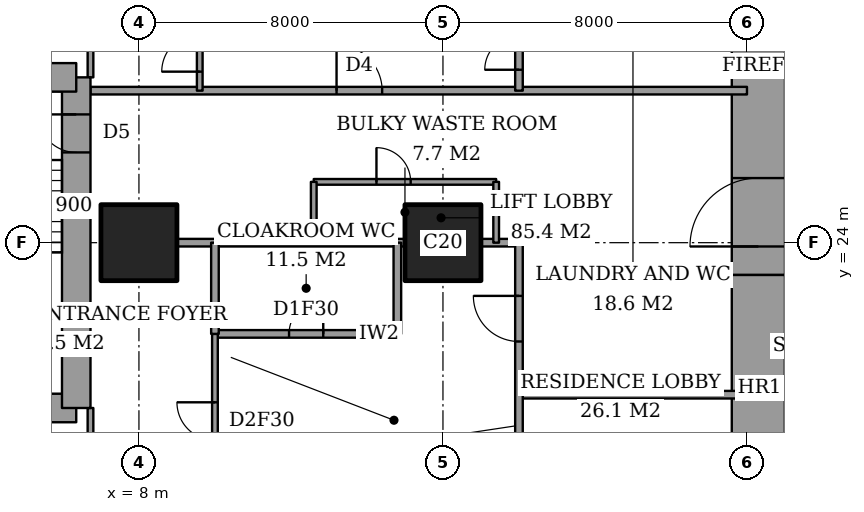
"""IFC4 building model, lengths in metres.
Left out: names, types, materials, properties, quantities, classifications, styles, units other than length and angle.
Written with IfcOpenShell. Run it as: python <this file> out.ifc"""

import sys

from ifc_helpers import new_model, si_unit, direction, frame, frame_2d, origin, origin_2d, place, context, subcontext, project, spatial, rectangle, extrude, element, fill, save


model = new_model("IFC4")
c1 = context("Model", 3, precision=1e-05, world=origin(), true_north=direction((0.0, 1.0)))
c2 = subcontext(c1, "Body", "Model", "MODEL_VIEW")
j1 = project(units=[si_unit("LENGTHUNIT", "METRE"), si_unit("PLANEANGLEUNIT", "RADIAN")], contexts=[c1])
p1 = place(None, origin())
s1 = spatial("IfcSite", under=j1, at=p1, CompositionType="ELEMENT")
p2 = place(p1, origin())
s2 = spatial("IfcBuilding", under=s1, at=p2, CompositionType="ELEMENT")
p3 = place(p2, frame((0.0, 0.0, 40.4)))
s3 = spatial("IfcBuildingStorey", under=s2, at=p3, CompositionType="ELEMENT", Elevation=40.4)
for number, where, z_axis, x_axis in (
    (1, (8.0, 24.0, 0.0), (0.0, 0.0, 1.0), (1.0, 0.0, 0.0)),
    (2, (16.0, 24.0, 0.0), (0.0, 0.0, 1.0), (1.0, 0.0, 0.0)),
):
    element("IfcColumn", number, at=place(p3, frame(where, z_axis=z_axis, x_axis=x_axis)), inside=s3, PredefinedType="COLUMN", context=c2, shape_type="SweptSolid", body=[
        extrude(rectangle(XDim=2.0, YDim=2.0, at=origin_2d()), origin(), (0.0, 0.0, 1.0), 3.6),
    ])
p4 = place(p3, frame((24.3, 13.0, 0.0), z_axis=(0.0, 0.0, 1.0), x_axis=(0.0, 1.0, 0.0)))
e3 = element("IfcWall", 3, at=p4, inside=s3, PredefinedType="SHEAR", context=c2, shape_type="SweptSolid", body=[
    extrude(rectangle(XDim=10.15, YDim=1.4, at=frame_2d((5.075, 0.0))), origin(), (0.0, 0.0, 1.0), 3.6),
])
p5 = place(p3, frame((24.3, 23.15, 0.0), z_axis=(0.0, 0.0, 1.0), x_axis=(0.0, 1.0, 0.0)))
e4 = element("IfcWall", 4, at=p5, inside=s3, PredefinedType="SHEAR", context=c2, shape_type="SweptSolid", body=[
    extrude(rectangle(XDim=11.85, YDim=1.4, at=frame_2d((5.925, 0.0))), origin(), (0.0, 0.0, 1.0), 3.6),
])
p6 = place(p5, frame((0.75, 0.0, 0.0)))
e5 = element("IfcOpeningElement", 5, at=p6, cuts=e4, PredefinedType="OPENING", context=c2, shape_type="SweptSolid", body=[
    extrude(rectangle(XDim=1.8, YDim=2.4, at=frame_2d((0.9, 1.2))), frame((0.0, 0.71, 0.0), z_axis=(0.0, -1.0, 0.0), x_axis=(1.0, 0.0, 0.0)), (0.0, 0.0, 1.0), 1.42),
])
p7 = place(p3, frame((1.9, 19.65, 0.0), z_axis=(0.0, 0.0, 1.0), x_axis=(1.0, 0.0, 0.0)))
e6 = element("IfcWall", 6, at=p7, inside=s3, PredefinedType="SHEAR", context=c2, shape_type="SweptSolid", body=[
    extrude(rectangle(XDim=4.45, YDim=0.75, at=frame_2d((2.225, 0.0))), origin(), (0.0, 0.0, 1.0), 3.6),
])
p8 = place(p3, frame((6.35, 19.65, 0.0), z_axis=(0.0, 0.0, 1.0), x_axis=(0.0, 1.0, 0.0)))
e7 = element("IfcWall", 7, at=p8, inside=s3, PredefinedType="SHEAR", context=c2, shape_type="SweptSolid", body=[
    extrude(rectangle(XDim=8.7, YDim=0.75, at=frame_2d((4.35, 0.0))), origin(), (0.0, 0.0, 1.0), 3.6),
])
p9 = place(p8, frame((6.725, 0.0, 0.0)))
e8 = element("IfcOpeningElement", 8, at=p9, cuts=e7, PredefinedType="OPENING", context=c2, shape_type="SweptSolid", body=[
    extrude(rectangle(XDim=1.0, YDim=2.1, at=frame_2d((0.5, 1.05))), frame((0.0, 0.385, 0.0), z_axis=(0.0, -1.0, 0.0), x_axis=(1.0, 0.0, 0.0)), (0.0, 0.0, 1.0), 0.77),
])
p10 = place(p3, frame((6.35, 28.35, 0.0), z_axis=(0.0, 0.0, 1.0), x_axis=(-1.0, 0.0, 0.0)))
e9 = element("IfcWall", 9, at=p10, inside=s3, PredefinedType="SHEAR", context=c2, shape_type="SweptSolid", body=[
    extrude(rectangle(XDim=4.45, YDim=0.75, at=frame_2d((2.225, 0.0))), origin(), (0.0, 0.0, 1.0), 3.6),
])
p11 = place(p3, frame((18.0, 20.0, 0.0), z_axis=(0.0, 0.0, 1.0), x_axis=(1.0, 0.0, 0.0)))
e10 = element("IfcWall", 10, at=p11, inside=s3, PredefinedType="PARTITIONING", context=c2, shape_type="SweptSolid", body=[
    extrude(rectangle(XDim=6.0, YDim=0.2, at=frame_2d((3.0, 0.0))), origin(), (0.0, 0.0, 1.0), 3.35),
])
p12 = place(p3, frame((10.0, 21.6, 0.0), z_axis=(0.0, 0.0, 1.0), x_axis=(1.0, 0.0, 0.0)))
e11 = element("IfcWall", 11, at=p12, inside=s3, PredefinedType="PARTITIONING", context=c2, shape_type="SweptSolid", body=[
    extrude(rectangle(XDim=4.8, YDim=0.2, at=frame_2d((2.4, 0.0))), origin(), (0.0, 0.0, 1.0), 3.35),
])
p13 = place(p12, frame((1.95, 0.0, 0.0)))
e12 = element("IfcOpeningElement", 12, at=p13, cuts=e11, PredefinedType="OPENING", context=c2, shape_type="SweptSolid", body=[
    extrude(rectangle(XDim=0.9, YDim=2.1, at=frame_2d((0.45, 1.05))), frame((0.0, 0.11, 0.0), z_axis=(0.0, -1.0, 0.0), x_axis=(1.0, 0.0, 0.0)), (0.0, 0.0, 1.0), 0.22),
])
p14 = place(p3, frame((9.0, 24.0, 0.0), z_axis=(0.0, 0.0, 1.0), x_axis=(1.0, 0.0, 0.0)))
e13 = element("IfcWall", 13, at=p14, inside=s3, PredefinedType="PARTITIONING", context=c2, shape_type="SweptSolid", body=[
    extrude(rectangle(XDim=6.0, YDim=0.2, at=frame_2d((3.0, 0.0))), origin(), (0.0, 0.0, 1.0), 3.35),
])
p15 = place(p3, frame((17.0, 24.0, 0.0), z_axis=(0.0, 0.0, 1.0), x_axis=(1.0, 0.0, 0.0)))
e14 = element("IfcWall", 14, at=p15, inside=s3, PredefinedType="PARTITIONING", context=c2, shape_type="SweptSolid", body=[
    extrude(rectangle(XDim=1.0, YDim=0.2, at=frame_2d((0.5, 0.0))), origin(), (0.0, 0.0, 1.0), 3.35),
])
p16 = place(p3, frame((12.6, 25.6, 0.0), z_axis=(0.0, 0.0, 1.0), x_axis=(1.0, 0.0, 0.0)))
e15 = element("IfcWall", 15, at=p16, inside=s3, PredefinedType="PARTITIONING", context=c2, shape_type="SweptSolid", body=[
    extrude(rectangle(XDim=4.8, YDim=0.15, at=frame_2d((2.4, 0.0))), origin(), (0.0, 0.0, 1.0), 3.35),
])
p17 = place(p16, frame((1.65, 0.0, 0.0)))
e16 = element("IfcOpeningElement", 16, at=p17, cuts=e15, PredefinedType="OPENING", context=c2, shape_type="SweptSolid", body=[
    extrude(rectangle(XDim=0.9, YDim=2.1, at=frame_2d((0.45, 1.05))), frame((0.0, 0.085, 0.0), z_axis=(0.0, -1.0, 0.0), x_axis=(1.0, 0.0, 0.0)), (0.0, 0.0, 1.0), 0.17),
])
p18 = place(p3, frame((6.725, 28.0, 0.0), z_axis=(0.0, 0.0, 1.0), x_axis=(1.0, 0.0, 0.0)))
e17 = element("IfcWall", 17, at=p18, inside=s3, PredefinedType="PARTITIONING", context=c2, shape_type="SweptSolid", body=[
    extrude(rectangle(XDim=17.275, YDim=0.2, at=frame_2d((8.637, 0.0))), origin(), (0.0, 0.0, 1.0), 3.35),
])
p19 = place(p18, frame((6.475, 0.0, 0.0)))
e18 = element("IfcOpeningElement", 18, at=p19, cuts=e17, PredefinedType="OPENING", context=c2, shape_type="SweptSolid", body=[
    extrude(rectangle(XDim=1.2, YDim=2.4, at=frame_2d((0.6, 1.2))), frame((0.0, 0.11, 0.0), z_axis=(0.0, -1.0, 0.0), x_axis=(1.0, 0.0, 0.0)), (0.0, 0.0, 1.0), 0.22),
])
p20 = place(p3, frame((6.725, 17.2, 0.0), z_axis=(0.0, 0.0, 1.0), x_axis=(0.0, 1.0, 0.0)))
e19 = element("IfcWall", 19, at=p20, inside=s3, PredefinedType="PARTITIONING", context=c2, shape_type="SweptSolid", body=[
    extrude(rectangle(XDim=2.45, YDim=0.15, at=frame_2d((1.225, 0.0))), origin(), (0.0, 0.0, 1.0), 3.35),
])
p21 = place(p20, frame((0.538, 0.0, 0.0)))
e20 = element("IfcOpeningElement", 20, at=p21, cuts=e19, PredefinedType="OPENING", context=c2, shape_type="SweptSolid", body=[
    extrude(rectangle(XDim=1.0, YDim=2.1, at=frame_2d((0.5, 1.05))), frame((0.0, 0.085, 0.0), z_axis=(0.0, -1.0, 0.0), x_axis=(1.0, 0.0, 0.0)), (0.0, 0.0, 1.0), 0.17),
])
p22 = place(p3, frame((6.725, 28.35, 0.0), z_axis=(0.0, 0.0, 1.0), x_axis=(0.0, 1.0, 0.0)))
e21 = element("IfcWall", 21, at=p22, inside=s3, PredefinedType="PARTITIONING", context=c2, shape_type="SweptSolid", body=[
    extrude(rectangle(XDim=2.45, YDim=0.15, at=frame_2d((1.225, 0.0))), origin(), (0.0, 0.0, 1.0), 3.35),
])
p23 = place(p22, frame((0.913, 0.0, 0.0)))
e22 = element("IfcOpeningElement", 22, at=p23, cuts=e21, PredefinedType="OPENING", context=c2, shape_type="SweptSolid", body=[
    extrude(rectangle(XDim=1.0, YDim=2.1, at=frame_2d((0.5, 1.05))), frame((0.0, 0.085, 0.0), z_axis=(0.0, -1.0, 0.0), x_axis=(1.0, 0.0, 0.0)), (0.0, 0.0, 1.0), 0.17),
])
p24 = place(p3, frame((9.6, 28.0, 0.0), z_axis=(0.0, 0.0, 1.0), x_axis=(0.0, 1.0, 0.0)))
e23 = element("IfcWall", 23, at=p24, inside=s3, PredefinedType="PARTITIONING", context=c2, shape_type="SweptSolid", body=[
    extrude(rectangle(XDim=9.4, YDim=0.15, at=frame_2d((4.7, 0.0))), origin(), (0.0, 0.0, 1.0), 3.35),
])
p25 = place(p24, frame((0.5, 0.0, 0.0)))
e24 = element("IfcOpeningElement", 24, at=p25, cuts=e23, PredefinedType="OPENING", context=c2, shape_type="SweptSolid", body=[
    extrude(rectangle(XDim=1.0, YDim=2.1, at=frame_2d((0.5, 1.05))), frame((0.0, 0.085, 0.0), z_axis=(0.0, -1.0, 0.0), x_axis=(1.0, 0.0, 0.0)), (0.0, 0.0, 1.0), 0.17),
])
p26 = place(p3, frame((10.0, 21.6, 0.0), z_axis=(0.0, 0.0, 1.0), x_axis=(0.0, 1.0, 0.0)))
e25 = element("IfcWall", 25, at=p26, inside=s3, PredefinedType="PARTITIONING", context=c2, shape_type="SweptSolid", body=[
    extrude(rectangle(XDim=2.4, YDim=0.2, at=frame_2d((1.2, 0.0))), origin(), (0.0, 0.0, 1.0), 3.35),
])
p27 = place(p3, frame((10.0, 10.6, 0.0), z_axis=(0.0, 0.0, 1.0), x_axis=(0.0, 1.0, 0.0)))
e26 = element("IfcWall", 26, at=p27, inside=s3, PredefinedType="PARTITIONING", context=c2, shape_type="SweptSolid", body=[
    extrude(rectangle(XDim=11.0, YDim=0.15, at=frame_2d((5.5, 0.0))), origin(), (0.0, 0.0, 1.0), 3.35),
])
p28 = place(p27, frame((8.2, 0.0, 0.0)))
e27 = element("IfcOpeningElement", 27, at=p28, cuts=e26, PredefinedType="OPENING", context=c2, shape_type="SweptSolid", body=[
    extrude(rectangle(XDim=1.0, YDim=2.1, at=frame_2d((0.5, 1.05))), frame((0.0, 0.085, 0.0), z_axis=(0.0, -1.0, 0.0), x_axis=(1.0, 0.0, 0.0)), (0.0, 0.0, 1.0), 0.17),
])
p29 = place(p3, frame((12.6, 24.0, 0.0), z_axis=(0.0, 0.0, 1.0), x_axis=(0.0, 1.0, 0.0)))
e28 = element("IfcWall", 28, at=p29, inside=s3, PredefinedType="PARTITIONING", context=c2, shape_type="SweptSolid", body=[
    extrude(rectangle(XDim=1.6, YDim=0.15, at=frame_2d((0.8, 0.0))), origin(), (0.0, 0.0, 1.0), 3.35),
])
p30 = place(p3, frame((14.8, 21.6, 0.0), z_axis=(0.0, 0.0, 1.0), x_axis=(0.0, 1.0, 0.0)))
e29 = element("IfcWall", 29, at=p30, inside=s3, PredefinedType="PARTITIONING", context=c2, shape_type="SweptSolid", body=[
    extrude(rectangle(XDim=2.4, YDim=0.2, at=frame_2d((1.2, 0.0))), origin(), (0.0, 0.0, 1.0), 3.35),
])
p31 = place(p3, frame((17.4, 24.0, 0.0), z_axis=(0.0, 0.0, 1.0), x_axis=(0.0, 1.0, 0.0)))
e30 = element("IfcWall", 30, at=p31, inside=s3, PredefinedType="PARTITIONING", context=c2, shape_type="SweptSolid", body=[
    extrude(rectangle(XDim=1.6, YDim=0.15, at=frame_2d((0.8, 0.0))), origin(), (0.0, 0.0, 1.0), 3.35),
])
p32 = place(p3, frame((18.0, 17.0, 0.0), z_axis=(0.0, 0.0, 1.0), x_axis=(0.0, 1.0, 0.0)))
e31 = element("IfcWall", 31, at=p32, inside=s3, PredefinedType="PARTITIONING", context=c2, shape_type="SweptSolid", body=[
    extrude(rectangle(XDim=7.0, YDim=0.2, at=frame_2d((3.5, 0.0))), origin(), (0.0, 0.0, 1.0), 3.35),
])
p33 = place(p32, frame((4.4, 0.0, 0.0)))
e32 = element("IfcOpeningElement", 32, at=p33, cuts=e31, PredefinedType="OPENING", context=c2, shape_type="SweptSolid", body=[
    extrude(rectangle(XDim=1.2, YDim=2.4, at=frame_2d((0.6, 1.2))), frame((0.0, 0.11, 0.0), z_axis=(0.0, -1.0, 0.0), x_axis=(1.0, 0.0, 0.0)), (0.0, 0.0, 1.0), 0.22),
])
p34 = place(p32, frame((1.05, 0.0, 0.0)))
e33 = element("IfcOpeningElement", 33, at=p34, cuts=e31, PredefinedType="OPENING", context=c2, shape_type="SweptSolid", body=[
    extrude(rectangle(XDim=0.9, YDim=2.1, at=frame_2d((0.45, 1.05))), frame((0.0, 0.11, 0.0), z_axis=(0.0, -1.0, 0.0), x_axis=(1.0, 0.0, 0.0)), (0.0, 0.0, 1.0), 0.22),
])
p35 = place(p3, frame((18.0, 28.0, 0.0), z_axis=(0.0, 0.0, 1.0), x_axis=(0.0, 1.0, 0.0)))
e34 = element("IfcWall", 34, at=p35, inside=s3, PredefinedType="PARTITIONING", context=c2, shape_type="SweptSolid", body=[
    extrude(rectangle(XDim=3.1, YDim=0.2, at=frame_2d((1.55, 0.0))), origin(), (0.0, 0.0, 1.0), 3.35),
])
p36 = place(p35, frame((0.55, 0.0, 0.0)))
e35 = element("IfcOpeningElement", 35, at=p36, cuts=e34, PredefinedType="OPENING", context=c2, shape_type="SweptSolid", body=[
    extrude(rectangle(XDim=0.9, YDim=2.1, at=frame_2d((0.45, 1.05))), frame((0.0, 0.11, 0.0), z_axis=(0.0, -1.0, 0.0), x_axis=(1.0, 0.0, 0.0)), (0.0, 0.0, 1.0), 0.22),
])
p37 = place(p28, origin())
e36 = element("IfcDoor", 36, at=p37, inside=s3, OperationType="SINGLE_SWING_LEFT", PredefinedType="DOOR", context=c2, shape_type="SweptSolid", body=[
    extrude(rectangle(XDim=1.0, YDim=2.1, at=frame_2d((0.5, 1.05))), frame((0.0, 0.025, 0.0), z_axis=(0.0, -1.0, 0.0), x_axis=(1.0, 0.0, 0.0)), (0.0, 0.0, 1.0), 0.05),
])
fill(e27, e36)
p38 = place(p13, origin())
e37 = element("IfcDoor", 37, at=p38, inside=s3, OperationType="SINGLE_SWING_LEFT", PredefinedType="DOOR", context=c2, shape_type="SweptSolid", body=[
    extrude(rectangle(XDim=0.9, YDim=2.1, at=frame_2d((0.45, 1.05))), frame((0.0, 0.025, 0.0), z_axis=(0.0, -1.0, 0.0), x_axis=(1.0, 0.0, 0.0)), (0.0, 0.0, 1.0), 0.05),
])
fill(e12, e37)
p39 = place(p33, origin())
e38 = element("IfcDoor", 38, at=p39, inside=s3, OperationType="SINGLE_SWING_LEFT", PredefinedType="DOOR", context=c2, shape_type="SweptSolid", body=[
    extrude(rectangle(XDim=1.2, YDim=2.4, at=frame_2d((0.6, 1.2))), frame((0.0, 0.025, 0.0), z_axis=(0.0, -1.0, 0.0), x_axis=(1.0, 0.0, 0.0)), (0.0, 0.0, 1.0), 0.05),
])
fill(e32, e38)
p40 = place(p25, origin())
e39 = element("IfcDoor", 39, at=p40, inside=s3, OperationType="SINGLE_SWING_RIGHT", PredefinedType="DOOR", context=c2, shape_type="SweptSolid", body=[
    extrude(rectangle(XDim=1.0, YDim=2.1, at=frame_2d((0.5, 1.05))), frame((0.0, 0.025, 0.0), z_axis=(0.0, -1.0, 0.0), x_axis=(1.0, 0.0, 0.0)), (0.0, 0.0, 1.0), 0.05),
])
fill(e24, e39)
p41 = place(p19, origin())
e40 = element("IfcDoor", 40, at=p41, inside=s3, OperationType="SINGLE_SWING_RIGHT", PredefinedType="DOOR", context=c2, shape_type="SweptSolid", body=[
    extrude(rectangle(XDim=1.2, YDim=2.4, at=frame_2d((0.6, 1.2))), frame((0.0, 0.025, 0.0), z_axis=(0.0, -1.0, 0.0), x_axis=(1.0, 0.0, 0.0)), (0.0, 0.0, 1.0), 0.05),
])
fill(e18, e40)
p42 = place(p36, origin())
e41 = element("IfcDoor", 41, at=p42, inside=s3, OperationType="SINGLE_SWING_RIGHT", PredefinedType="DOOR", context=c2, shape_type="SweptSolid", body=[
    extrude(rectangle(XDim=0.9, YDim=2.1, at=frame_2d((0.45, 1.05))), frame((0.0, 0.025, 0.0), z_axis=(0.0, -1.0, 0.0), x_axis=(1.0, 0.0, 0.0)), (0.0, 0.0, 1.0), 0.05),
])
fill(e35, e41)
p43 = place(p17, origin())
e42 = element("IfcDoor", 42, at=p43, inside=s3, OperationType="SINGLE_SWING_RIGHT", PredefinedType="DOOR", context=c2, shape_type="SweptSolid", body=[
    extrude(rectangle(XDim=0.9, YDim=2.1, at=frame_2d((0.45, 1.05))), frame((0.0, 0.025, 0.0), z_axis=(0.0, -1.0, 0.0), x_axis=(1.0, 0.0, 0.0)), (0.0, 0.0, 1.0), 0.05),
])
fill(e16, e42)
p44 = place(p6, origin())
e43 = element("IfcDoor", 43, at=p44, inside=s3, OperationType="DOUBLE_DOOR_DOUBLE_SWING", PredefinedType="DOOR", context=c2, shape_type="SweptSolid", body=[
    extrude(rectangle(XDim=1.8, YDim=2.4, at=frame_2d((0.9, 1.2))), frame((0.0, 0.025, 0.0), z_axis=(0.0, -1.0, 0.0), x_axis=(1.0, 0.0, 0.0)), (0.0, 0.0, 1.0), 0.05),
])
fill(e5, e43)
p45 = place(p9, origin())
e44 = element("IfcDoor", 44, at=p45, inside=s3, OperationType="SINGLE_SWING_LEFT", PredefinedType="DOOR", context=c2, shape_type="SweptSolid", body=[
    extrude(rectangle(XDim=1.0, YDim=2.1, at=frame_2d((0.5, 1.05))), frame((0.0, 0.025, 0.0), z_axis=(0.0, -1.0, 0.0), x_axis=(1.0, 0.0, 0.0)), (0.0, 0.0, 1.0), 0.05),
])
fill(e8, e44)
save(model, sys.argv[1])
